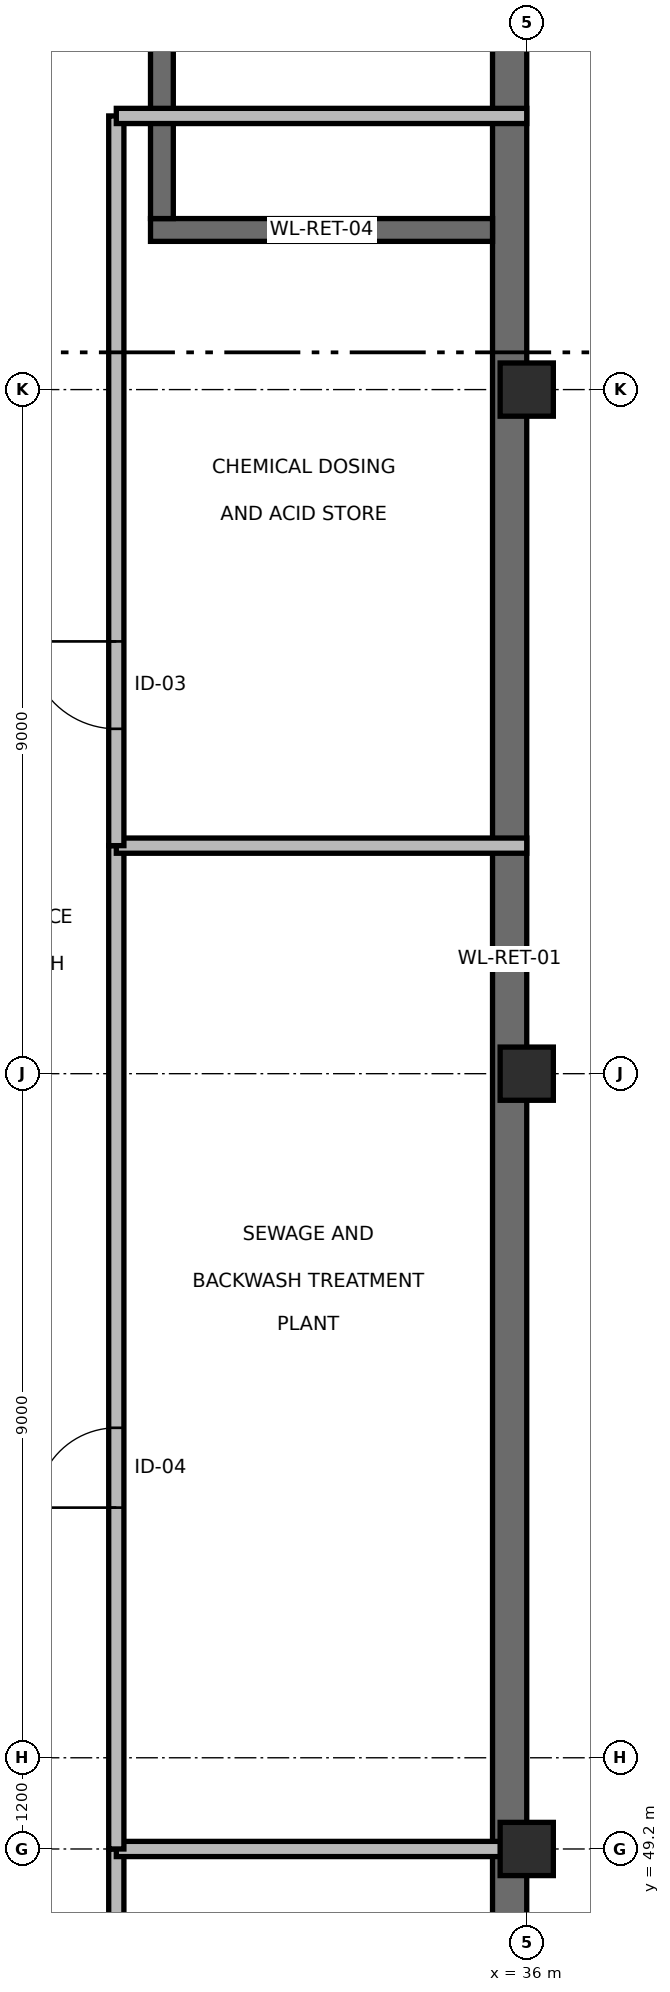
"""IFC4 building model, lengths in metres.
Left out: names, types, materials, properties, quantities, classifications, styles, units other than length and angle.
Written with IfcOpenShell. Run it as: python <this file> out.ifc"""

import sys

from ifc_helpers import new_model, si_unit, direction, frame, frame_2d, origin, origin_2d, place, context, subcontext, project, spatial, rectangle, extrude, element, fill, save


model = new_model("IFC4")
c1 = context("Model", 3, precision=1e-05, world=origin(), true_north=direction((0.0, 1.0)))
c2 = subcontext(c1, "Body", "Model", "MODEL_VIEW")
j1 = project(units=[si_unit("LENGTHUNIT", "METRE"), si_unit("PLANEANGLEUNIT", "RADIAN")], contexts=[c1])
p1 = place(None, origin())
s1 = spatial("IfcSite", under=j1, at=p1, CompositionType="ELEMENT")
p2 = place(p1, origin())
s2 = spatial("IfcBuilding", under=s1, at=p2, CompositionType="ELEMENT")
p3 = place(p2, frame((0.0, 0.0, -4.8)))
s3 = spatial("IfcBuildingStorey", under=s2, at=p3, CompositionType="ELEMENT", Elevation=-4.8)
for number, where, z_axis, x_axis in (
    (1, (36.0, 49.2, 0.0), (0.0, 0.0, 1.0), (1.0, 0.0, 0.0)),
    (2, (36.0, 59.4, 0.0), (0.0, 0.0, 1.0), (1.0, 0.0, 0.0)),
    (3, (36.0, 68.4, 0.0), (0.0, 0.0, 1.0), (1.0, 0.0, 0.0)),
):
    element("IfcColumn", number, at=place(p3, frame(where, z_axis=z_axis, x_axis=x_axis)), inside=s3, PredefinedType="COLUMN", context=c2, shape_type="SweptSolid", body=[
        extrude(rectangle(XDim=0.7, YDim=0.7, at=origin_2d()), origin(), (0.0, 0.0, 1.0), 4.8),
    ])
p4 = place(p3, frame((35.775, 4.65, 0.0), z_axis=(0.0, 0.0, 1.0), x_axis=(0.0, 1.0, 0.0)))
e4 = element("IfcWall", 4, at=p4, inside=s3, PredefinedType="USERDEFINED", context=c2, shape_type="SweptSolid", body=[
    extrude(rectangle(XDim=110.1, YDim=0.45, at=frame_2d((55.05, 0.0))), origin(), (0.0, 0.0, 1.0), 4.5),
])
p5 = place(p3, frame((31.05, 70.5, 0.0), z_axis=(0.0, 0.0, 1.0), x_axis=(1.0, 0.0, 0.0)))
e5 = element("IfcWall", 5, at=p5, inside=s3, PredefinedType="USERDEFINED", context=c2, shape_type="SweptSolid", body=[
    extrude(rectangle(XDim=4.5, YDim=0.3, at=frame_2d((2.25, 0.0))), origin(), (0.0, 0.0, 1.0), 3.6),
])
p6 = place(p3, frame((31.2, 70.65, 0.0), z_axis=(0.0, 0.0, 1.0), x_axis=(0.0, 1.0, 0.0)))
e6 = element("IfcWall", 6, at=p6, inside=s3, PredefinedType="USERDEFINED", context=c2, shape_type="SweptSolid", body=[
    extrude(rectangle(XDim=4.7, YDim=0.3, at=frame_2d((2.35, 0.0))), origin(), (0.0, 0.0, 1.0), 3.6),
])
p7 = place(p3, frame((30.6, 36.0, 0.0), z_axis=(0.0, 0.0, 1.0), x_axis=(0.0, 1.0, 0.0)))
e7 = element("IfcWall", 7, at=p7, inside=s3, PredefinedType="PARTITIONING", context=c2, shape_type="SweptSolid", body=[
    extrude(rectangle(XDim=13.2, YDim=0.2, at=frame_2d((6.6, 0.0))), origin(), (0.0, 0.0, 1.0), 3.835),
])
p8 = place(p7, frame((7.609, 0.0, 0.0)))
e8 = element("IfcOpeningElement", 8, at=p8, cuts=e7, PredefinedType="OPENING", context=c2, shape_type="SweptSolid", body=[
    extrude(rectangle(XDim=1.15, YDim=2.2, at=frame_2d((0.575, 1.1))), frame((0.0, 0.11, 0.0), z_axis=(0.0, -1.0, 0.0), x_axis=(1.0, 0.0, 0.0)), (0.0, 0.0, 1.0), 0.22),
])
p9 = place(p3, frame((30.6, 49.2, 0.0), z_axis=(0.0, 0.0, 1.0), x_axis=(1.0, 0.0, 0.0)))
e9 = element("IfcWall", 9, at=p9, inside=s3, PredefinedType="PARTITIONING", context=c2, shape_type="SweptSolid", body=[
    extrude(rectangle(XDim=5.4, YDim=0.2, at=frame_2d((2.7, 0.0))), origin(), (0.0, 0.0, 1.0), 3.735),
])
p10 = place(p3, frame((30.6, 49.2, 0.0), z_axis=(0.0, 0.0, 1.0), x_axis=(0.0, 1.0, 0.0)))
e10 = element("IfcWall", 10, at=p10, inside=s3, PredefinedType="PARTITIONING", context=c2, shape_type="SweptSolid", body=[
    extrude(rectangle(XDim=13.2, YDim=0.2, at=frame_2d((6.6, 0.0))), origin(), (0.0, 0.0, 1.0), 3.835),
])
p11 = place(p10, frame((4.491, 0.0, 0.0)))
e11 = element("IfcOpeningElement", 11, at=p11, cuts=e10, PredefinedType="OPENING", context=c2, shape_type="SweptSolid", body=[
    extrude(rectangle(XDim=1.05, YDim=2.15, at=frame_2d((0.525, 1.075))), frame((0.0, 0.11, 0.0), z_axis=(0.0, -1.0, 0.0), x_axis=(1.0, 0.0, 0.0)), (0.0, 0.0, 1.0), 0.22),
])
p12 = place(p3, frame((30.6, 62.4, 0.0), z_axis=(0.0, 0.0, 1.0), x_axis=(1.0, 0.0, 0.0)))
e12 = element("IfcWall", 12, at=p12, inside=s3, PredefinedType="PARTITIONING", context=c2, shape_type="SweptSolid", body=[
    extrude(rectangle(XDim=5.4, YDim=0.2, at=frame_2d((2.7, 0.0))), origin(), (0.0, 0.0, 1.0), 3.885),
])
p13 = place(p3, frame((30.6, 62.4, 0.0), z_axis=(0.0, 0.0, 1.0), x_axis=(0.0, 1.0, 0.0)))
e13 = element("IfcWall", 13, at=p13, inside=s3, PredefinedType="PARTITIONING", context=c2, shape_type="SweptSolid", body=[
    extrude(rectangle(XDim=9.6, YDim=0.2, at=frame_2d((4.8, 0.0))), origin(), (0.0, 0.0, 1.0), 3.835),
])
p14 = place(p13, frame((1.537, 0.0, 0.0)))
e14 = element("IfcOpeningElement", 14, at=p14, cuts=e13, PredefinedType="OPENING", context=c2, shape_type="SweptSolid", body=[
    extrude(rectangle(XDim=1.15, YDim=2.2, at=frame_2d((0.575, 1.1))), frame((0.0, 0.11, 0.0), z_axis=(0.0, -1.0, 0.0), x_axis=(1.0, 0.0, 0.0)), (0.0, 0.0, 1.0), 0.22),
])
p15 = place(p3, frame((30.6, 72.0, 0.0), z_axis=(0.0, 0.0, 1.0), x_axis=(1.0, 0.0, 0.0)))
e15 = element("IfcWall", 15, at=p15, inside=s3, PredefinedType="PARTITIONING", context=c2, shape_type="SweptSolid", body=[
    extrude(rectangle(XDim=5.4, YDim=0.2, at=frame_2d((2.7, 0.0))), origin(), (0.0, 0.0, 1.0), 3.885),
])
p16 = place(p11, origin())
e16 = element("IfcDoor", 16, at=p16, inside=s3, OperationType="SINGLE_SWING_LEFT", PredefinedType="DOOR", context=c2, shape_type="SweptSolid", body=[
    extrude(rectangle(XDim=1.05, YDim=2.15, at=frame_2d((0.525, 1.075))), frame((0.0, 0.025, 0.0), z_axis=(0.0, -1.0, 0.0), x_axis=(1.0, 0.0, 0.0)), (0.0, 0.0, 1.0), 0.05),
])
fill(e11, e16)
p17 = place(p14, origin())
e17 = element("IfcDoor", 17, at=p17, inside=s3, OperationType="SINGLE_SWING_RIGHT", PredefinedType="DOOR", context=c2, shape_type="SweptSolid", body=[
    extrude(rectangle(XDim=1.15, YDim=2.2, at=frame_2d((0.575, 1.1))), frame((0.0, 0.025, 0.0), z_axis=(0.0, -1.0, 0.0), x_axis=(1.0, 0.0, 0.0)), (0.0, 0.0, 1.0), 0.05),
])
fill(e14, e17)
save(model, sys.argv[1])
